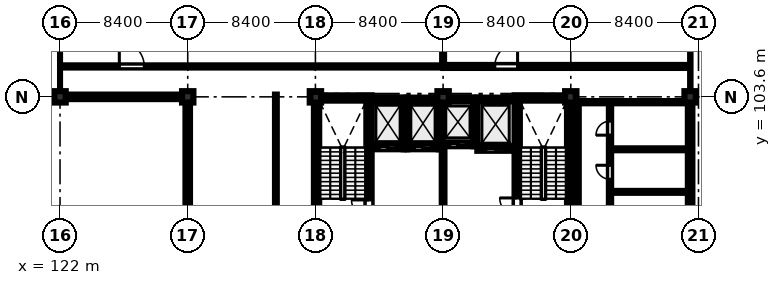
"""IFC4 building model, lengths in metres.
Left out: names, types, materials, properties, quantities, classifications, styles, units other than length and angle.
Written with IfcOpenShell. Run it as: python <this file> out.ifc"""

import sys

from ifc_helpers import new_model, si_unit, direction, frame, frame_2d, origin, origin_2d, place, context, subcontext, project, spatial, rectangle, extrude, element, fill, save


model = new_model("IFC4")
c1 = context("Model", 3, precision=1e-05, world=origin(), true_north=direction((0.0, 1.0)))
c2 = subcontext(c1, "Body", "Model", "MODEL_VIEW")
j1 = project(units=[si_unit("LENGTHUNIT", "METRE"), si_unit("PLANEANGLEUNIT", "RADIAN")], contexts=[c1])
p1 = place(None, origin())
s1 = spatial("IfcSite", under=j1, at=p1, CompositionType="ELEMENT")
p2 = place(p1, origin())
s2 = spatial("IfcBuilding", under=s1, at=p2, CompositionType="ELEMENT")
p3 = place(p2, frame((0.0, 0.0, 48.6)))
s3 = spatial("IfcBuildingStorey", under=s2, at=p3, CompositionType="ELEMENT", Elevation=48.6)
for number, where, z_axis, x_axis in (
    (1, (122.0, 103.6, 0.0), (0.0, 0.0, 1.0), (1.0, 0.0, 0.0)),
    (2, (130.4, 103.6, 0.0), (0.0, 0.0, 1.0), (1.0, 0.0, 0.0)),
    (3, (138.8, 103.6, 0.0), (0.0, 0.0, 1.0), (1.0, 0.0, 0.0)),
    (4, (147.2, 103.6, 0.0), (0.0, 0.0, 1.0), (1.0, 0.0, 0.0)),
    (5, (155.6, 103.6, 0.0), (0.0, 0.0, 1.0), (1.0, 0.0, 0.0)),
    (6, (163.45, 103.6, 0.0), (0.0, 0.0, 1.0), (1.0, 0.0, 0.0)),
):
    element("IfcColumn", number, at=place(p3, frame(where, z_axis=z_axis, x_axis=x_axis)), inside=s3, PredefinedType="COLUMN", context=c2, shape_type="SweptSolid", body=[
        extrude(rectangle(XDim=0.75, YDim=0.75, at=origin_2d()), origin(), (0.0, 0.0, 1.0), 4.03),
    ])
p4 = place(p3, frame((138.7, 103.525, 0.0), z_axis=(0.0, 0.0, 1.0), x_axis=(1.0, 0.0, 0.0)))
e7 = element("IfcWall", 7, at=p4, inside=s3, PredefinedType="SHEAR", context=c2, shape_type="SweptSolid", body=[
    extrude(rectangle(XDim=3.8, YDim=0.35, at=frame_2d((1.9, 0.0))), origin(), (0.0, 0.0, 1.0), 4.03),
])
p5 = place(p3, frame((138.875, 95.45, 0.0), z_axis=(0.0, 0.0, 1.0), x_axis=(0.0, 1.0, 0.0)))
e8 = element("IfcWall", 8, at=p5, inside=s3, PredefinedType="SHEAR", context=c2, shape_type="SweptSolid", body=[
    extrude(rectangle(XDim=7.9, YDim=0.35, at=frame_2d((3.95, 0.0))), origin(), (0.0, 0.0, 1.0), 4.03),
])
p6 = place(p3, frame((142.325, 95.45, 0.0), z_axis=(0.0, 0.0, 1.0), x_axis=(0.0, 1.0, 0.0)))
e9 = element("IfcWall", 9, at=p6, inside=s3, PredefinedType="SHEAR", context=c2, shape_type="SweptSolid", body=[
    extrude(rectangle(XDim=7.9, YDim=0.35, at=frame_2d((3.95, 0.0))), origin(), (0.0, 0.0, 1.0), 4.03),
])
p7 = place(p6, frame((0.22, 0.0, 0.0)))
e10 = element("IfcOpeningElement", 10, at=p7, cuts=e9, PredefinedType="OPENING", context=c2, shape_type="SweptSolid", body=[
    extrude(rectangle(XDim=1.15, YDim=2.15, at=frame_2d((0.575, 1.075))), frame((0.0, 0.185, 0.0), z_axis=(0.0, -1.0, 0.0), x_axis=(1.0, 0.0, 0.0)), (0.0, 0.0, 1.0), 0.37),
])
p8 = place(p3, frame((151.9, 103.525, 0.0), z_axis=(0.0, 0.0, 1.0), x_axis=(1.0, 0.0, 0.0)))
e11 = element("IfcWall", 11, at=p8, inside=s3, PredefinedType="SHEAR", context=c2, shape_type="SweptSolid", body=[
    extrude(rectangle(XDim=3.8, YDim=0.35, at=frame_2d((1.9, 0.0))), origin(), (0.0, 0.0, 1.0), 4.03),
])
p9 = place(p3, frame((152.075, 95.45, 0.0), z_axis=(0.0, 0.0, 1.0), x_axis=(0.0, 1.0, 0.0)))
e12 = element("IfcWall", 12, at=p9, inside=s3, PredefinedType="SHEAR", context=c2, shape_type="SweptSolid", body=[
    extrude(rectangle(XDim=7.9, YDim=0.35, at=frame_2d((3.95, 0.0))), origin(), (0.0, 0.0, 1.0), 4.03),
])
p10 = place(p9, frame((0.35, 0.0, 0.0)))
e13 = element("IfcOpeningElement", 13, at=p10, cuts=e12, PredefinedType="OPENING", context=c2, shape_type="SweptSolid", body=[
    extrude(rectangle(XDim=1.15, YDim=2.15, at=frame_2d((0.575, 1.075))), frame((0.0, 0.185, 0.0), z_axis=(0.0, -1.0, 0.0), x_axis=(1.0, 0.0, 0.0)), (0.0, 0.0, 1.0), 0.37),
])
p11 = place(p3, frame((155.525, 95.45, 0.0), z_axis=(0.0, 0.0, 1.0), x_axis=(0.0, 1.0, 0.0)))
e14 = element("IfcWall", 14, at=p11, inside=s3, PredefinedType="SHEAR", context=c2, shape_type="SweptSolid", body=[
    extrude(rectangle(XDim=7.9, YDim=0.35, at=frame_2d((3.95, 0.0))), origin(), (0.0, 0.0, 1.0), 4.03),
])
p12 = place(p3, frame((142.5, 100.275, 0.0), z_axis=(0.0, 0.0, 1.0), x_axis=(1.0, 0.0, 0.0)))
e15 = element("IfcWall", 15, at=p12, inside=s3, PredefinedType="SHEAR", context=c2, shape_type="SweptSolid", body=[
    extrude(rectangle(XDim=2.1, YDim=0.25, at=frame_2d((1.05, 0.0))), origin(), (0.0, 0.0, 1.0), 4.03),
])
p13 = place(p12, frame((0.5, 0.0, 0.0)))
e16 = element("IfcOpeningElement", 16, at=p13, cuts=e15, PredefinedType="OPENING", context=c2, shape_type="SweptSolid", body=[
    extrude(rectangle(XDim=1.1, YDim=2.15, at=frame_2d((0.55, 1.075))), frame((0.0, 0.135, 0.0), z_axis=(0.0, -1.0, 0.0), x_axis=(1.0, 0.0, 0.0)), (0.0, 0.0, 1.0), 0.27),
])
p14 = place(p3, frame((142.5, 103.425, 0.0), z_axis=(0.0, 0.0, 1.0), x_axis=(1.0, 0.0, 0.0)))
e17 = element("IfcWall", 17, at=p14, inside=s3, PredefinedType="SHEAR", context=c2, shape_type="SweptSolid", body=[
    extrude(rectangle(XDim=2.1, YDim=0.25, at=frame_2d((1.05, 0.0))), origin(), (0.0, 0.0, 1.0), 4.03),
])
p15 = place(p3, frame((144.725, 100.15, 0.0), z_axis=(0.0, 0.0, 1.0), x_axis=(0.0, 1.0, 0.0)))
e18 = element("IfcWall", 18, at=p15, inside=s3, PredefinedType="SHEAR", context=c2, shape_type="SweptSolid", body=[
    extrude(rectangle(XDim=3.4, YDim=0.25, at=frame_2d((1.7, 0.0))), origin(), (0.0, 0.0, 1.0), 4.03),
])
p16 = place(p3, frame((144.85, 100.275, 0.0), z_axis=(0.0, 0.0, 1.0), x_axis=(1.0, 0.0, 0.0)))
e19 = element("IfcWall", 19, at=p16, inside=s3, PredefinedType="SHEAR", context=c2, shape_type="SweptSolid", body=[
    extrude(rectangle(XDim=2.05, YDim=0.25, at=frame_2d((1.025, 0.0))), origin(), (0.0, 0.0, 1.0), 4.03),
])
p17 = place(p16, frame((0.465, 0.0, 0.0)))
e20 = element("IfcOpeningElement", 20, at=p17, cuts=e19, PredefinedType="OPENING", context=c2, shape_type="SweptSolid", body=[
    extrude(rectangle(XDim=1.12, YDim=2.15, at=frame_2d((0.56, 1.075))), frame((0.0, 0.135, 0.0), z_axis=(0.0, -1.0, 0.0), x_axis=(1.0, 0.0, 0.0)), (0.0, 0.0, 1.0), 0.27),
])
p18 = place(p3, frame((144.85, 103.425, 0.0), z_axis=(0.0, 0.0, 1.0), x_axis=(1.0, 0.0, 0.0)))
e21 = element("IfcWall", 21, at=p18, inside=s3, PredefinedType="SHEAR", context=c2, shape_type="SweptSolid", body=[
    extrude(rectangle(XDim=2.05, YDim=0.25, at=frame_2d((1.025, 0.0))), origin(), (0.0, 0.0, 1.0), 4.03),
])
p19 = place(p3, frame((147.025, 100.15, 0.0), z_axis=(0.0, 0.0, 1.0), x_axis=(0.0, 1.0, 0.0)))
e22 = element("IfcWall", 22, at=p19, inside=s3, PredefinedType="SHEAR", context=c2, shape_type="SweptSolid", body=[
    extrude(rectangle(XDim=3.4, YDim=0.25, at=frame_2d((1.7, 0.0))), origin(), (0.0, 0.0, 1.0), 4.03),
])
p20 = place(p3, frame((147.15, 100.475, 0.0), z_axis=(0.0, 0.0, 1.0), x_axis=(1.0, 0.0, 0.0)))
e23 = element("IfcWall", 23, at=p20, inside=s3, PredefinedType="SHEAR", context=c2, shape_type="SweptSolid", body=[
    extrude(rectangle(XDim=2.05, YDim=0.25, at=frame_2d((1.025, 0.0))), origin(), (0.0, 0.0, 1.0), 4.03),
])
p21 = place(p20, frame((0.495, 0.0, 0.0)))
e24 = element("IfcOpeningElement", 24, at=p21, cuts=e23, PredefinedType="OPENING", context=c2, shape_type="SweptSolid", body=[
    extrude(rectangle(XDim=1.06, YDim=2.15, at=frame_2d((0.53, 1.075))), frame((0.0, 0.135, 0.0), z_axis=(0.0, -1.0, 0.0), x_axis=(1.0, 0.0, 0.0)), (0.0, 0.0, 1.0), 0.27),
])
p22 = place(p3, frame((147.15, 103.425, 0.0), z_axis=(0.0, 0.0, 1.0), x_axis=(1.0, 0.0, 0.0)))
e25 = element("IfcWall", 25, at=p22, inside=s3, PredefinedType="SHEAR", context=c2, shape_type="SweptSolid", body=[
    extrude(rectangle(XDim=2.05, YDim=0.25, at=frame_2d((1.025, 0.0))), origin(), (0.0, 0.0, 1.0), 4.03),
])
p23 = place(p3, frame((149.325, 100.35, 0.0), z_axis=(0.0, 0.0, 1.0), x_axis=(0.0, 1.0, 0.0)))
e26 = element("IfcWall", 26, at=p23, inside=s3, PredefinedType="SHEAR", context=c2, shape_type="SweptSolid", body=[
    extrude(rectangle(XDim=3.2, YDim=0.25, at=frame_2d((1.6, 0.0))), origin(), (0.0, 0.0, 1.0), 4.03),
])
p24 = place(p3, frame((149.45, 100.175, 0.0), z_axis=(0.0, 0.0, 1.0), x_axis=(1.0, 0.0, 0.0)))
e27 = element("IfcWall", 27, at=p24, inside=s3, PredefinedType="SHEAR", context=c2, shape_type="SweptSolid", body=[
    extrude(rectangle(XDim=2.45, YDim=0.25, at=frame_2d((1.225, 0.0))), origin(), (0.0, 0.0, 1.0), 4.03),
])
p25 = place(p24, frame((0.575, 0.0, 0.0)))
e28 = element("IfcOpeningElement", 28, at=p25, cuts=e27, PredefinedType="OPENING", context=c2, shape_type="SweptSolid", body=[
    extrude(rectangle(XDim=1.3, YDim=2.25, at=frame_2d((0.65, 1.125))), frame((0.0, 0.135, 0.0), z_axis=(0.0, -1.0, 0.0), x_axis=(1.0, 0.0, 0.0)), (0.0, 0.0, 1.0), 0.27),
])
p26 = place(p3, frame((149.45, 103.425, 0.0), z_axis=(0.0, 0.0, 1.0), x_axis=(1.0, 0.0, 0.0)))
e29 = element("IfcWall", 29, at=p26, inside=s3, PredefinedType="SHEAR", context=c2, shape_type="SweptSolid", body=[
    extrude(rectangle(XDim=2.45, YDim=0.25, at=frame_2d((1.225, 0.0))), origin(), (0.0, 0.0, 1.0), 4.03),
])
p27 = place(p3, frame((163.45, 103.225, 0.0), z_axis=(0.0, 0.0, 1.0), x_axis=(0.0, -1.0, 0.0)))
e30 = element("IfcWall", 30, at=p27, inside=s3, PredefinedType="STANDARD", context=c2, shape_type="SweptSolid", body=[
    extrude(rectangle(XDim=7.65, YDim=0.3, at=frame_2d((3.825, 0.0))), origin(), (0.0, 0.0, 1.0), 3.33),
])
p28 = place(p27, frame((1.15, 0.0, 1.1)))
e31 = element("IfcOpeningElement", 31, at=p28, cuts=e30, PredefinedType="OPENING", context=c2, shape_type="SweptSolid", body=[
    extrude(rectangle(XDim=1.4, YDim=1.4, at=frame_2d((0.7, 0.7))), frame((0.0, 0.16, 0.0), z_axis=(0.0, -1.0, 0.0), x_axis=(1.0, 0.0, 0.0)), (0.0, 0.0, 1.0), 0.32),
])
p29 = place(p3, frame((130.4, 95.575, 0.0), z_axis=(0.0, 0.0, 1.0), x_axis=(0.0, 1.0, 0.0)))
e32 = element("IfcWall", 32, at=p29, inside=s3, PredefinedType="STANDARD", context=c2, shape_type="SweptSolid", body=[
    extrude(rectangle(XDim=7.65, YDim=0.3, at=frame_2d((3.825, 0.0))), origin(), (0.0, 0.0, 1.0), 3.33),
])
p30 = place(p29, frame((2.4, 0.0, 1.0)))
e33 = element("IfcOpeningElement", 33, at=p30, cuts=e32, PredefinedType="OPENING", context=c2, shape_type="SweptSolid", body=[
    extrude(rectangle(XDim=1.8, YDim=1.8, at=frame_2d((0.9, 0.9))), frame((0.0, 0.16, 0.0), z_axis=(0.0, -1.0, 0.0), x_axis=(1.0, 0.0, 0.0)), (0.0, 0.0, 1.0), 0.32),
])
p31 = place(p3, frame((130.025, 103.6, 0.0), z_axis=(0.0, 0.0, 1.0), x_axis=(-1.0, 0.0, 0.0)))
e34 = element("IfcWall", 34, at=p31, inside=s3, PredefinedType="STANDARD", context=c2, shape_type="SweptSolid", body=[
    extrude(rectangle(XDim=7.65, YDim=0.3, at=frame_2d((3.825, 0.0))), origin(), (0.0, 0.0, 1.0), 3.33),
])
p32 = place(p3, frame((147.2, 95.75, 0.0), z_axis=(0.0, 0.0, 1.0), x_axis=(0.0, 1.0, 0.0)))
e35 = element("IfcWall", 35, at=p32, inside=s3, PredefinedType="STANDARD", context=c2, shape_type="SweptSolid", body=[
    extrude(rectangle(XDim=4.5, YDim=0.18, at=frame_2d((2.25, 0.0))), origin(), (0.0, 0.0, 1.0), 3.33),
])
p33 = place(p3, frame((158.18, 94.68, 0.0), z_axis=(0.0, 0.0, 1.0), x_axis=(0.0, 1.0, 0.0)))
e36 = element("IfcWall", 36, at=p33, inside=s3, PredefinedType="PARTITIONING", context=c2, shape_type="SweptSolid", body=[
    extrude(rectangle(XDim=8.57, YDim=0.15, at=frame_2d((4.285, 0.0))), origin(), (0.0, 0.0, 1.0), 4.03),
])
p34 = place(p33, frame((0.8, 0.0, 0.0)))
e37 = element("IfcOpeningElement", 37, at=p34, cuts=e36, PredefinedType="OPENING", context=c2, shape_type="SweptSolid", body=[
    extrude(rectangle(XDim=1.0, YDim=2.12, at=frame_2d((0.5, 1.06))), frame((0.0, 0.085, 0.0), z_axis=(0.0, -1.0, 0.0), x_axis=(1.0, 0.0, 0.0)), (0.0, 0.0, 1.0), 0.17),
])
p35 = place(p33, frame((3.5, 0.0, 0.0)))
e38 = element("IfcOpeningElement", 38, at=p35, cuts=e36, PredefinedType="OPENING", context=c2, shape_type="SweptSolid", body=[
    extrude(rectangle(XDim=0.92, YDim=2.1, at=frame_2d((0.46, 1.05))), frame((0.0, 0.085, 0.0), z_axis=(0.0, -1.0, 0.0), x_axis=(1.0, 0.0, 0.0)), (0.0, 0.0, 1.0), 0.17),
])
p36 = place(p33, frame((6.4, 0.0, 0.0)))
e39 = element("IfcOpeningElement", 39, at=p36, cuts=e36, PredefinedType="OPENING", context=c2, shape_type="SweptSolid", body=[
    extrude(rectangle(XDim=0.92, YDim=2.1, at=frame_2d((0.46, 1.05))), frame((0.0, 0.085, 0.0), z_axis=(0.0, -1.0, 0.0), x_axis=(1.0, 0.0, 0.0)), (0.0, 0.0, 1.0), 0.17),
])
for number, where, z_axis, x_axis in (
    (40, (158.18, 97.35, 0.0), (0.0, 0.0, 1.0), (1.0, 0.0, 0.0)),
    (41, (158.18, 100.15, 0.0), (0.0, 0.0, 1.0), (1.0, 0.0, 0.0)),
):
    element("IfcWall", number, at=place(p3, frame(where, z_axis=z_axis, x_axis=x_axis)), inside=s3, PredefinedType="PARTITIONING", context=c2, shape_type="SweptSolid", body=[
        extrude(rectangle(XDim=5.02, YDim=0.128, at=frame_2d((2.51, 0.0))), origin(), (0.0, 0.0, 1.0), 4.03),
    ])
p37 = place(p3, frame((156.05, 103.25, 0.0), z_axis=(0.0, 0.0, 1.0), x_axis=(1.0, 0.0, 0.0)))
e42 = element("IfcWall", 42, at=p37, inside=s3, PredefinedType="PARTITIONING", context=c2, shape_type="SweptSolid", body=[
    extrude(rectangle(XDim=7.15, YDim=0.15, at=frame_2d((3.575, 0.0))), origin(), (0.0, 0.0, 1.0), 4.03),
])
p38 = place(p3, frame((156.05, 94.68, 0.0), z_axis=(0.0, 0.0, 1.0), x_axis=(0.0, 1.0, 0.0)))
e43 = element("IfcWall", 43, at=p38, inside=s3, PredefinedType="PARTITIONING", context=c2, shape_type="SweptSolid", body=[
    extrude(rectangle(XDim=8.57, YDim=0.15, at=frame_2d((4.285, 0.0))), origin(), (0.0, 0.0, 1.0), 4.03),
])
p39 = place(p3, frame((136.2, 94.68, 0.0), z_axis=(0.0, 0.0, 1.0), x_axis=(0.0, 1.0, 0.0)))
e44 = element("IfcWall", 44, at=p39, inside=s3, PredefinedType="PARTITIONING", context=c2, shape_type="SweptSolid", body=[
    extrude(rectangle(XDim=9.07, YDim=0.12, at=frame_2d((4.535, 0.0))), origin(), (0.0, 0.0, 1.0), 4.03),
])
p40 = place(p3, frame((122.15, 105.6, 0.0), z_axis=(0.0, 0.0, 1.0), x_axis=(1.0, 0.0, 0.0)))
e45 = element("IfcWall", 45, at=p40, inside=s3, PredefinedType="PARTITIONING", context=c2, shape_type="SweptSolid", body=[
    extrude(rectangle(XDim=25.05, YDim=0.145, at=frame_2d((12.525, 0.0))), origin(), (0.0, 0.0, 1.0), 4.03),
])
p41 = place(p40, frame((3.75, 0.0, 0.0)))
e46 = element("IfcOpeningElement", 46, at=p41, cuts=e45, PredefinedType="OPENING", context=c2, shape_type="SweptSolid", body=[
    extrude(rectangle(XDim=1.64, YDim=2.24, at=frame_2d((0.82, 1.12))), frame((0.0, 0.083, 0.0), z_axis=(0.0, -1.0, 0.0), x_axis=(1.0, 0.0, 0.0)), (0.0, 0.0, 1.0), 0.165),
])
p42 = place(p3, frame((147.2, 105.6, 0.0), z_axis=(0.0, 0.0, 1.0), x_axis=(1.0, 0.0, 0.0)))
e47 = element("IfcWall", 47, at=p42, inside=s3, PredefinedType="SOLIDWALL", context=c2, shape_type="SweptSolid", body=[
    extrude(rectangle(XDim=16.15, YDim=0.2, at=frame_2d((8.075, 0.0))), origin(), (0.0, 0.0, 1.0), 4.03),
])
p43 = place(p42, frame((3.4, 0.0, 0.0)))
e48 = element("IfcOpeningElement", 48, at=p43, cuts=e47, PredefinedType="OPENING", context=c2, shape_type="SweptSolid", body=[
    extrude(rectangle(XDim=1.5, YDim=2.2, at=frame_2d((0.75, 1.1))), frame((0.0, 0.11, 0.0), z_axis=(0.0, -1.0, 0.0), x_axis=(1.0, 0.0, 0.0)), (0.0, 0.0, 1.0), 0.22),
])
p44 = place(p3, frame((147.2, 105.6, 0.0), z_axis=(0.0, 0.0, 1.0), x_axis=(0.0, 1.0, 0.0)))
e49 = element("IfcWall", 49, at=p44, inside=s3, PredefinedType="PARTITIONING", context=c2, shape_type="SweptSolid", body=[
    extrude(rectangle(XDim=5.75, YDim=0.128, at=frame_2d((2.875, 0.0))), origin(), (0.0, 0.0, 1.0), 3.33),
])
p45 = place(p28, origin())
e50 = element("IfcWindow", 50, at=p45, inside=s3, PartitioningType="SINGLE_PANEL", PredefinedType="WINDOW", context=c2, shape_type="SweptSolid", body=[
    extrude(rectangle(XDim=1.4, YDim=1.4, at=frame_2d((0.7, 0.7))), frame((0.0, 0.03, 0.0), z_axis=(0.0, -1.0, 0.0), x_axis=(1.0, 0.0, 0.0)), (0.0, 0.0, 1.0), 0.06),
])
fill(e31, e50)
p46 = place(p30, origin())
e51 = element("IfcWindow", 51, at=p46, inside=s3, PartitioningType="DOUBLE_PANEL_VERTICAL", PredefinedType="WINDOW", context=c2, shape_type="SweptSolid", body=[
    extrude(rectangle(XDim=1.8, YDim=1.8, at=frame_2d((0.9, 0.9))), frame((0.0, 0.03, 0.0), z_axis=(0.0, -1.0, 0.0), x_axis=(1.0, 0.0, 0.0)), (0.0, 0.0, 1.0), 0.06),
])
fill(e33, e51)
p47 = place(p34, origin())
e52 = element("IfcDoor", 52, at=p47, inside=s3, OperationType="SINGLE_SWING_LEFT", PredefinedType="DOOR", context=c2, shape_type="SweptSolid", body=[
    extrude(rectangle(XDim=1.0, YDim=2.12, at=frame_2d((0.5, 1.06))), frame((0.0, 0.025, 0.0), z_axis=(0.0, -1.0, 0.0), x_axis=(1.0, 0.0, 0.0)), (0.0, 0.0, 1.0), 0.05),
])
fill(e37, e52)
p48 = place(p35, origin())
e53 = element("IfcDoor", 53, at=p48, inside=s3, OperationType="SINGLE_SWING_RIGHT", PredefinedType="DOOR", context=c2, shape_type="SweptSolid", body=[
    extrude(rectangle(XDim=0.92, YDim=2.1, at=frame_2d((0.46, 1.05))), frame((0.0, 0.025, 0.0), z_axis=(0.0, -1.0, 0.0), x_axis=(1.0, 0.0, 0.0)), (0.0, 0.0, 1.0), 0.05),
])
fill(e38, e53)
p49 = place(p36, origin())
e54 = element("IfcDoor", 54, at=p49, inside=s3, OperationType="SINGLE_SWING_LEFT", PredefinedType="DOOR", context=c2, shape_type="SweptSolid", body=[
    extrude(rectangle(XDim=0.92, YDim=2.1, at=frame_2d((0.46, 1.05))), frame((0.0, 0.025, 0.0), z_axis=(0.0, -1.0, 0.0), x_axis=(1.0, 0.0, 0.0)), (0.0, 0.0, 1.0), 0.05),
])
fill(e39, e54)
p50 = place(p41, origin())
e55 = element("IfcDoor", 55, at=p50, inside=s3, OperationType="SINGLE_SWING_LEFT", PredefinedType="DOOR", context=c2, shape_type="SweptSolid", body=[
    extrude(rectangle(XDim=1.64, YDim=2.24, at=frame_2d((0.82, 1.12))), frame((0.0, 0.025, 0.0), z_axis=(0.0, -1.0, 0.0), x_axis=(1.0, 0.0, 0.0)), (0.0, 0.0, 1.0), 0.05),
])
fill(e46, e55)
p51 = place(p43, origin())
e56 = element("IfcDoor", 56, at=p51, inside=s3, OperationType="SINGLE_SWING_RIGHT", PredefinedType="DOOR", context=c2, shape_type="SweptSolid", body=[
    extrude(rectangle(XDim=1.5, YDim=2.2, at=frame_2d((0.75, 1.1))), frame((0.0, 0.025, 0.0), z_axis=(0.0, -1.0, 0.0), x_axis=(1.0, 0.0, 0.0)), (0.0, 0.0, 1.0), 0.05),
])
fill(e48, e56)
p52 = place(p7, origin())
e57 = element("IfcDoor", 57, at=p52, inside=s3, OperationType="SINGLE_SWING_RIGHT", PredefinedType="DOOR", context=c2, shape_type="SweptSolid", body=[
    extrude(rectangle(XDim=1.15, YDim=2.15, at=frame_2d((0.575, 1.075))), frame((0.0, 0.025, 0.0), z_axis=(0.0, -1.0, 0.0), x_axis=(1.0, 0.0, 0.0)), (0.0, 0.0, 1.0), 0.05),
])
fill(e10, e57)
p53 = place(p10, origin())
e58 = element("IfcDoor", 58, at=p53, inside=s3, OperationType="SINGLE_SWING_RIGHT", PredefinedType="DOOR", context=c2, shape_type="SweptSolid", body=[
    extrude(rectangle(XDim=1.15, YDim=2.15, at=frame_2d((0.575, 1.075))), frame((0.0, 0.025, 0.0), z_axis=(0.0, -1.0, 0.0), x_axis=(1.0, 0.0, 0.0)), (0.0, 0.0, 1.0), 0.05),
])
fill(e13, e58)
p54 = place(p13, origin())
e59 = element("IfcDoor", 59, at=p54, inside=s3, OperationType="SLIDING_TO_LEFT", PredefinedType="DOOR", context=c2, shape_type="SweptSolid", body=[
    extrude(rectangle(XDim=1.1, YDim=2.15, at=frame_2d((0.55, 1.075))), frame((0.0, 0.025, 0.0), z_axis=(0.0, -1.0, 0.0), x_axis=(1.0, 0.0, 0.0)), (0.0, 0.0, 1.0), 0.05),
])
fill(e16, e59)
p55 = place(p17, origin())
e60 = element("IfcDoor", 60, at=p55, inside=s3, OperationType="SLIDING_TO_LEFT", PredefinedType="DOOR", context=c2, shape_type="SweptSolid", body=[
    extrude(rectangle(XDim=1.12, YDim=2.15, at=frame_2d((0.56, 1.075))), frame((0.0, 0.025, 0.0), z_axis=(0.0, -1.0, 0.0), x_axis=(1.0, 0.0, 0.0)), (0.0, 0.0, 1.0), 0.05),
])
fill(e20, e60)
p56 = place(p21, origin())
e61 = element("IfcDoor", 61, at=p56, inside=s3, OperationType="SLIDING_TO_LEFT", PredefinedType="DOOR", context=c2, shape_type="SweptSolid", body=[
    extrude(rectangle(XDim=1.06, YDim=2.15, at=frame_2d((0.53, 1.075))), frame((0.0, 0.025, 0.0), z_axis=(0.0, -1.0, 0.0), x_axis=(1.0, 0.0, 0.0)), (0.0, 0.0, 1.0), 0.05),
])
fill(e24, e61)
p57 = place(p25, origin())
e62 = element("IfcDoor", 62, at=p57, inside=s3, OperationType="SLIDING_TO_LEFT", PredefinedType="DOOR", context=c2, shape_type="SweptSolid", body=[
    extrude(rectangle(XDim=1.3, YDim=2.25, at=frame_2d((0.65, 1.125))), frame((0.0, 0.025, 0.0), z_axis=(0.0, -1.0, 0.0), x_axis=(1.0, 0.0, 0.0)), (0.0, 0.0, 1.0), 0.05),
])
fill(e28, e62)
save(model, sys.argv[1])
